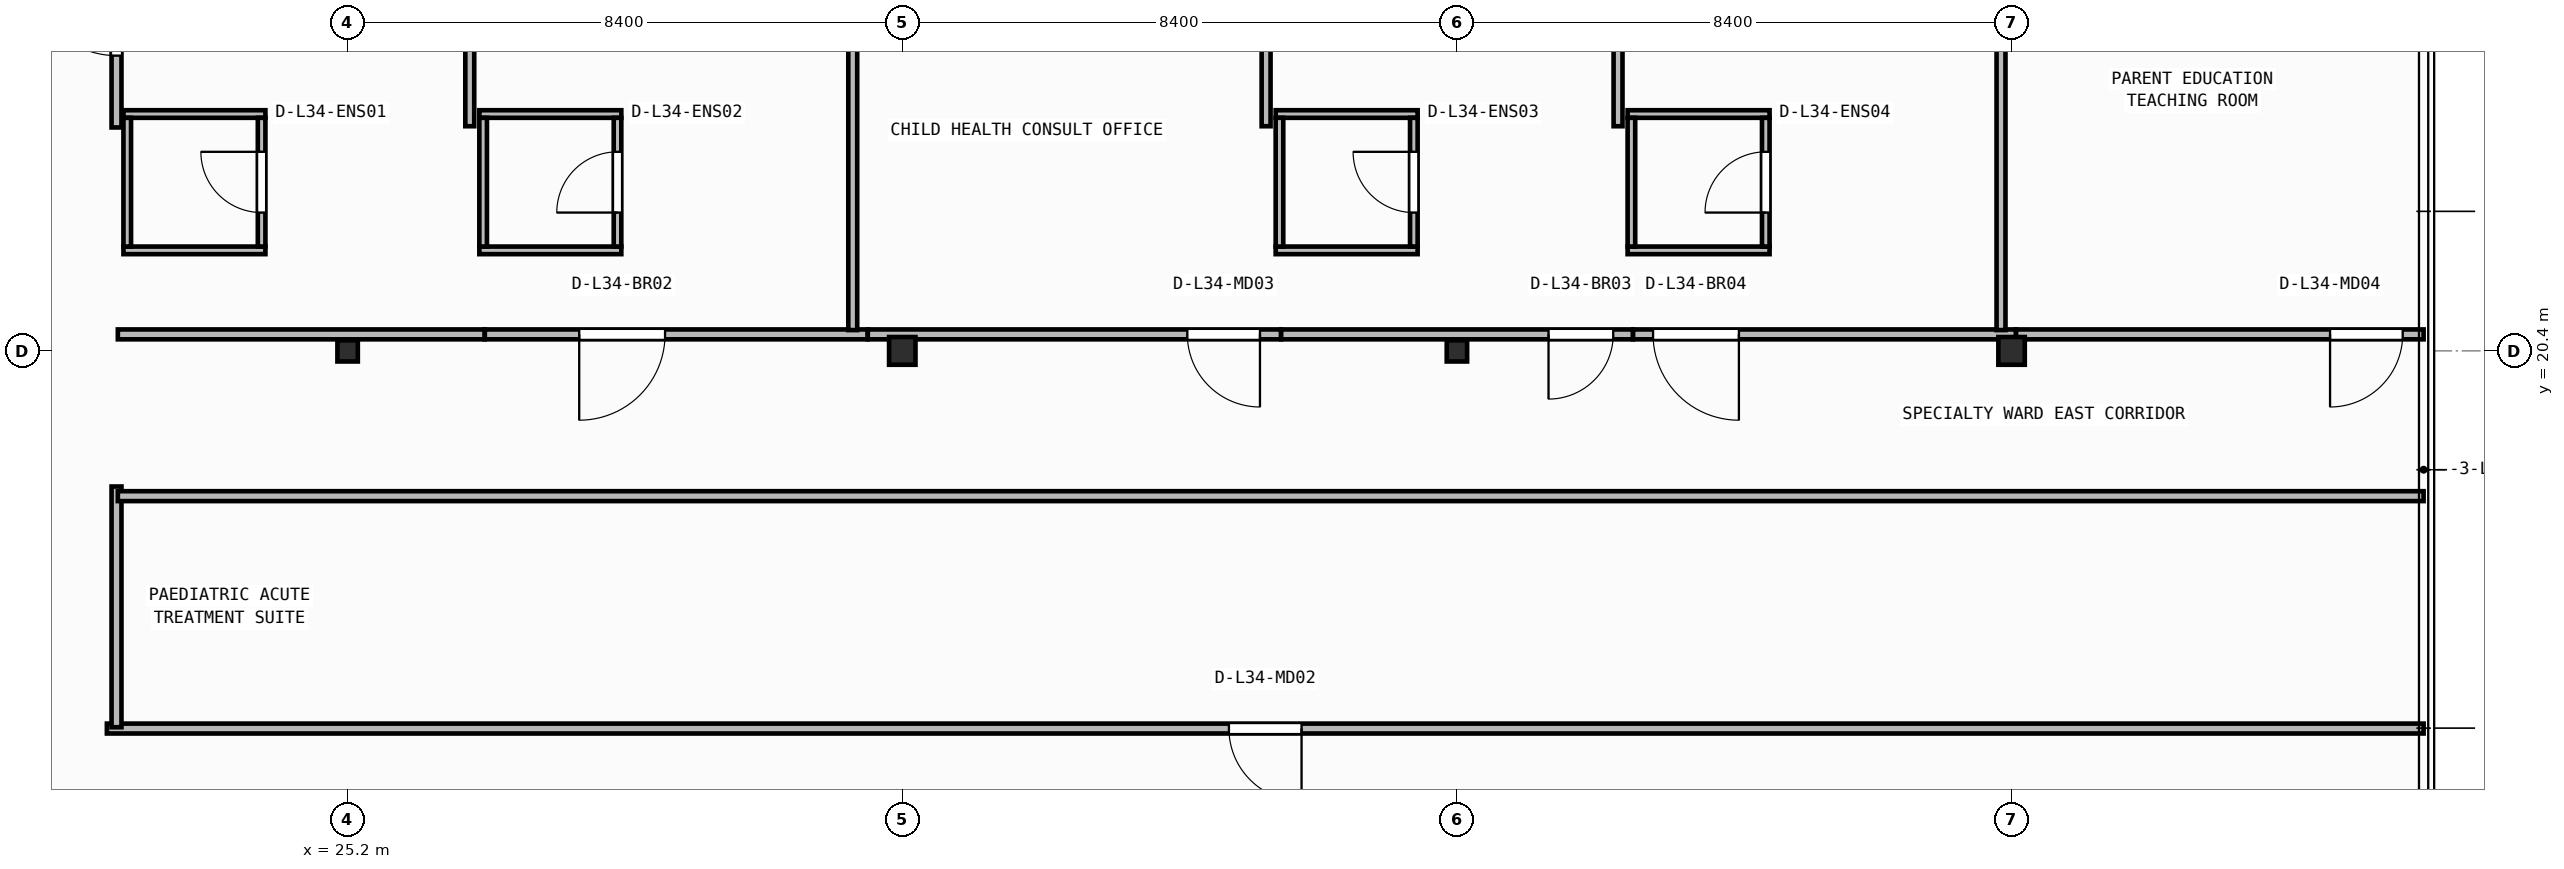
"""IFC4 building model, lengths in metres.
Left out: names, types, materials, properties, quantities, classifications, styles, units other than length and angle.
Written with IfcOpenShell. Run it as: python <this file> out.ifc"""

import sys

from ifc_helpers import new_model, si_unit, direction, frame, frame_2d, origin, origin_2d, place, context, subcontext, project, spatial, rectangle, i_section, extrude, element, fill, save


model = new_model("IFC4")
c1 = context("Model", 3, precision=1e-05, world=origin(), true_north=direction((0.0, 1.0)))
c2 = subcontext(c1, "Body", "Model", "MODEL_VIEW")
j1 = project(units=[si_unit("LENGTHUNIT", "METRE"), si_unit("PLANEANGLEUNIT", "RADIAN")], contexts=[c1])
p1 = place(None, origin())
s1 = spatial("IfcSite", under=j1, at=p1, CompositionType="ELEMENT")
p2 = place(p1, origin())
s2 = spatial("IfcBuilding", under=s1, at=p2, CompositionType="ELEMENT")
p3 = place(p2, frame((0.0, 0.0, 138.9)))
s3 = spatial("IfcBuildingStorey", under=s2, at=p3, CompositionType="ELEMENT", Elevation=138.9)
p4 = place(p3, frame((25.2, 20.4, 0.0), z_axis=(0.0, 0.0, 1.0), x_axis=(1.0, 0.0, 0.0)))
e1 = element("IfcColumn", 1, at=p4, inside=s3, PredefinedType="COLUMN", context=c2, shape_type="SweptSolid", body=[
    extrude(i_section(OverallWidth=0.309, OverallDepth=0.321, WebThickness=0.014, FlangeThickness=0.022, FilletRadius=0.017, at=origin_2d()), origin(), (0.0, 0.0, 1.0), 3.95),
])
p5 = place(p3, frame((33.6, 20.4, 0.0), z_axis=(0.0, 0.0, 1.0), x_axis=(1.0, 0.0, 0.0)))
e2 = element("IfcColumn", 2, at=p5, inside=s3, PredefinedType="COLUMN", context=c2, shape_type="SweptSolid", body=[
    extrude(i_section(OverallWidth=0.4, OverallDepth=0.42, WebThickness=0.025, FlangeThickness=0.04, at=origin_2d()), origin(), (0.0, 0.0, 1.0), 3.95),
])
p6 = place(p3, frame((42.0, 20.4, 0.0), z_axis=(0.0, 0.0, 1.0), x_axis=(1.0, 0.0, 0.0)))
e3 = element("IfcColumn", 3, at=p6, inside=s3, PredefinedType="COLUMN", context=c2, shape_type="SweptSolid", body=[
    extrude(i_section(OverallWidth=0.309, OverallDepth=0.321, WebThickness=0.014, FlangeThickness=0.022, FilletRadius=0.017, at=origin_2d()), origin(), (0.0, 0.0, 1.0), 3.95),
])
p7 = place(p3, frame((50.4, 20.4, 0.0), z_axis=(0.0, 0.0, 1.0), x_axis=(1.0, 0.0, 0.0)))
e4 = element("IfcColumn", 4, at=p7, inside=s3, PredefinedType="COLUMN", context=c2, shape_type="SweptSolid", body=[
    extrude(i_section(OverallWidth=0.4, OverallDepth=0.42, WebThickness=0.025, FlangeThickness=0.04, at=origin_2d()), origin(), (0.0, 0.0, 1.0), 3.95),
])
for number, where, z_axis, x_axis in (
    (5, (21.805, 21.923, 0.0), (0.0, 0.0, 1.0), (1.0, 0.0, 0.0)),
    (6, (21.805, 23.988, 0.0), (0.0, 0.0, 1.0), (1.0, 0.0, 0.0)),
):
    element("IfcWall", number, at=place(p3, frame(where, z_axis=z_axis, x_axis=x_axis)), inside=s3, PredefinedType="PARTITIONING", context=c2, shape_type="SweptSolid", body=[
        extrude(rectangle(XDim=2.15, YDim=0.115, at=frame_2d((1.075, 0.0))), origin(), (0.0, 0.0, 1.0), 3.71),
    ])
p8 = place(p3, frame((21.863, 21.98, 0.0), z_axis=(0.0, 0.0, 1.0), x_axis=(0.0, 1.0, 0.0)))
e7 = element("IfcWall", 7, at=p8, inside=s3, PredefinedType="PARTITIONING", context=c2, shape_type="SweptSolid", body=[
    extrude(rectangle(XDim=1.95, YDim=0.115, at=frame_2d((0.975, 0.0))), origin(), (0.0, 0.0, 1.0), 3.71),
])
p9 = place(p3, frame((23.897, 21.98, 0.0), z_axis=(0.0, 0.0, 1.0), x_axis=(0.0, 1.0, 0.0)))
e8 = element("IfcWall", 8, at=p9, inside=s3, PredefinedType="PARTITIONING", context=c2, shape_type="SweptSolid", body=[
    extrude(rectangle(XDim=1.95, YDim=0.115, at=frame_2d((0.975, 0.0))), origin(), (0.0, 0.0, 1.0), 3.71),
])
p10 = place(p9, frame((0.515, 0.0, 0.0)))
e9 = element("IfcOpeningElement", 9, at=p10, cuts=e8, PredefinedType="OPENING", context=c2, shape_type="SweptSolid", body=[
    extrude(rectangle(XDim=0.92, YDim=2.1, at=frame_2d((0.46, 1.05))), frame((0.0, 0.067, 0.0), z_axis=(0.0, -1.0, 0.0), x_axis=(1.0, 0.0, 0.0)), (0.0, 0.0, 1.0), 0.135),
])
for number, where, z_axis, x_axis in (
    (10, (27.195, 21.923, 0.0), (0.0, 0.0, 1.0), (1.0, 0.0, 0.0)),
    (11, (27.195, 23.988, 0.0), (0.0, 0.0, 1.0), (1.0, 0.0, 0.0)),
):
    element("IfcWall", number, at=place(p3, frame(where, z_axis=z_axis, x_axis=x_axis)), inside=s3, PredefinedType="PARTITIONING", context=c2, shape_type="SweptSolid", body=[
        extrude(rectangle(XDim=2.15, YDim=0.115, at=frame_2d((1.075, 0.0))), origin(), (0.0, 0.0, 1.0), 3.71),
    ])
p11 = place(p3, frame((27.252, 21.98, 0.0), z_axis=(0.0, 0.0, 1.0), x_axis=(0.0, 1.0, 0.0)))
e12 = element("IfcWall", 12, at=p11, inside=s3, PredefinedType="PARTITIONING", context=c2, shape_type="SweptSolid", body=[
    extrude(rectangle(XDim=1.95, YDim=0.115, at=frame_2d((0.975, 0.0))), origin(), (0.0, 0.0, 1.0), 3.71),
])
p12 = place(p3, frame((29.288, 21.98, 0.0), z_axis=(0.0, 0.0, 1.0), x_axis=(0.0, 1.0, 0.0)))
e13 = element("IfcWall", 13, at=p12, inside=s3, PredefinedType="PARTITIONING", context=c2, shape_type="SweptSolid", body=[
    extrude(rectangle(XDim=1.95, YDim=0.115, at=frame_2d((0.975, 0.0))), origin(), (0.0, 0.0, 1.0), 3.71),
])
p13 = place(p12, frame((0.515, 0.0, 0.0)))
e14 = element("IfcOpeningElement", 14, at=p13, cuts=e13, PredefinedType="OPENING", context=c2, shape_type="SweptSolid", body=[
    extrude(rectangle(XDim=0.92, YDim=2.1, at=frame_2d((0.46, 1.05))), frame((0.0, 0.067, 0.0), z_axis=(0.0, -1.0, 0.0), x_axis=(1.0, 0.0, 0.0)), (0.0, 0.0, 1.0), 0.135),
])
for number, where, z_axis, x_axis in (
    (15, (39.255, 21.923, 0.0), (0.0, 0.0, 1.0), (1.0, 0.0, 0.0)),
    (16, (39.255, 23.988, 0.0), (0.0, 0.0, 1.0), (1.0, 0.0, 0.0)),
):
    element("IfcWall", number, at=place(p3, frame(where, z_axis=z_axis, x_axis=x_axis)), inside=s3, PredefinedType="PARTITIONING", context=c2, shape_type="SweptSolid", body=[
        extrude(rectangle(XDim=2.15, YDim=0.115, at=frame_2d((1.075, 0.0))), origin(), (0.0, 0.0, 1.0), 3.71),
    ])
p14 = place(p3, frame((39.312, 21.98, 0.0), z_axis=(0.0, 0.0, 1.0), x_axis=(0.0, 1.0, 0.0)))
e17 = element("IfcWall", 17, at=p14, inside=s3, PredefinedType="PARTITIONING", context=c2, shape_type="SweptSolid", body=[
    extrude(rectangle(XDim=1.95, YDim=0.115, at=frame_2d((0.975, 0.0))), origin(), (0.0, 0.0, 1.0), 3.71),
])
p15 = place(p3, frame((41.347, 21.98, 0.0), z_axis=(0.0, 0.0, 1.0), x_axis=(0.0, 1.0, 0.0)))
e18 = element("IfcWall", 18, at=p15, inside=s3, PredefinedType="PARTITIONING", context=c2, shape_type="SweptSolid", body=[
    extrude(rectangle(XDim=1.95, YDim=0.115, at=frame_2d((0.975, 0.0))), origin(), (0.0, 0.0, 1.0), 3.71),
])
p16 = place(p15, frame((0.515, 0.0, 0.0)))
e19 = element("IfcOpeningElement", 19, at=p16, cuts=e18, PredefinedType="OPENING", context=c2, shape_type="SweptSolid", body=[
    extrude(rectangle(XDim=0.92, YDim=2.1, at=frame_2d((0.46, 1.05))), frame((0.0, 0.067, 0.0), z_axis=(0.0, -1.0, 0.0), x_axis=(1.0, 0.0, 0.0)), (0.0, 0.0, 1.0), 0.135),
])
for number, where, z_axis, x_axis in (
    (20, (44.585, 21.923, 0.0), (0.0, 0.0, 1.0), (1.0, 0.0, 0.0)),
    (21, (44.585, 23.988, 0.0), (0.0, 0.0, 1.0), (1.0, 0.0, 0.0)),
):
    element("IfcWall", number, at=place(p3, frame(where, z_axis=z_axis, x_axis=x_axis)), inside=s3, PredefinedType="PARTITIONING", context=c2, shape_type="SweptSolid", body=[
        extrude(rectangle(XDim=2.15, YDim=0.115, at=frame_2d((1.075, 0.0))), origin(), (0.0, 0.0, 1.0), 3.71),
    ])
p17 = place(p3, frame((44.643, 21.98, 0.0), z_axis=(0.0, 0.0, 1.0), x_axis=(0.0, 1.0, 0.0)))
e22 = element("IfcWall", 22, at=p17, inside=s3, PredefinedType="PARTITIONING", context=c2, shape_type="SweptSolid", body=[
    extrude(rectangle(XDim=1.95, YDim=0.115, at=frame_2d((0.975, 0.0))), origin(), (0.0, 0.0, 1.0), 3.71),
])
p18 = place(p3, frame((46.677, 21.98, 0.0), z_axis=(0.0, 0.0, 1.0), x_axis=(0.0, 1.0, 0.0)))
e23 = element("IfcWall", 23, at=p18, inside=s3, PredefinedType="PARTITIONING", context=c2, shape_type="SweptSolid", body=[
    extrude(rectangle(XDim=1.95, YDim=0.115, at=frame_2d((0.975, 0.0))), origin(), (0.0, 0.0, 1.0), 3.71),
])
p19 = place(p18, frame((0.515, 0.0, 0.0)))
e24 = element("IfcOpeningElement", 24, at=p19, cuts=e23, PredefinedType="OPENING", context=c2, shape_type="SweptSolid", body=[
    extrude(rectangle(XDim=0.92, YDim=2.1, at=frame_2d((0.46, 1.05))), frame((0.0, 0.067, 0.0), z_axis=(0.0, -1.0, 0.0), x_axis=(1.0, 0.0, 0.0)), (0.0, 0.0, 1.0), 0.135),
])
p20 = place(p3, frame((56.64, 14.68, 0.0), z_axis=(0.0, 0.0, 1.0), x_axis=(-1.0, 0.0, 0.0)))
e25 = element("IfcWall", 25, at=p20, inside=s3, PredefinedType="PARTITIONING", context=c2, shape_type="SweptSolid", body=[
    extrude(rectangle(XDim=35.086, YDim=0.15, at=frame_2d((17.543, 0.0))), origin(), (0.0, 0.0, 1.0), 3.71),
])
p21 = place(p20, frame((16.993, 0.0, 0.0)))
e26 = element("IfcOpeningElement", 26, at=p21, cuts=e25, PredefinedType="OPENING", context=c2, shape_type="SweptSolid", body=[
    extrude(rectangle(XDim=1.1, YDim=2.1, at=frame_2d((0.55, 1.05))), frame((0.0, 0.085, 0.0), z_axis=(0.0, -1.0, 0.0), x_axis=(1.0, 0.0, 0.0)), (0.0, 0.0, 1.0), 0.17),
])
p22 = place(p3, frame((21.7, 14.7, 0.0), z_axis=(0.0, 0.0, 1.0), x_axis=(0.0, 1.0, 0.0)))
e27 = element("IfcWall", 27, at=p22, inside=s3, PredefinedType="PARTITIONING", context=c2, shape_type="SweptSolid", body=[
    extrude(rectangle(XDim=3.646, YDim=0.15, at=frame_2d((1.823, 0.0))), origin(), (0.0, 0.0, 1.0), 3.71),
])
p23 = place(p3, frame((21.7, 23.784, 0.0), z_axis=(0.0, 0.0, 1.0), x_axis=(0.0, 1.0, 0.0)))
e28 = element("IfcWall", 28, at=p23, inside=s3, PredefinedType="PARTITIONING", context=c2, shape_type="SweptSolid", body=[
    extrude(rectangle(XDim=3.476, YDim=0.15, at=frame_2d((1.738, 0.0))), origin(), (0.0, 0.0, 1.0), 3.71),
])
p24 = place(p23, frame((1.088, 0.0, 0.0)))
e29 = element("IfcOpeningElement", 29, at=p24, cuts=e28, PredefinedType="OPENING", context=c2, shape_type="SweptSolid", body=[
    extrude(rectangle(XDim=1.3, YDim=2.15, at=frame_2d((0.65, 1.075))), frame((0.0, 0.085, 0.0), z_axis=(0.0, -1.0, 0.0), x_axis=(1.0, 0.0, 0.0)), (0.0, 0.0, 1.0), 0.17),
])
p25 = place(p3, frame((21.72, 18.2, 0.0), z_axis=(0.0, 0.0, 1.0), x_axis=(1.0, 0.0, 0.0)))
e30 = element("IfcWall", 30, at=p25, inside=s3, PredefinedType="PARTITIONING", context=c2, shape_type="SweptSolid", body=[
    extrude(rectangle(XDim=34.92, YDim=0.15, at=frame_2d((17.46, 0.0))), origin(), (0.0, 0.0, 1.0), 3.71),
])
p26 = place(p3, frame((27.276, 20.65, 0.0), z_axis=(0.0, 0.0, 1.0), x_axis=(-1.0, 0.0, 0.0)))
e31 = element("IfcWall", 31, at=p26, inside=s3, PredefinedType="PARTITIONING", context=c2, shape_type="SweptSolid", body=[
    extrude(rectangle(XDim=5.556, YDim=0.15, at=frame_2d((2.778, 0.0))), origin(), (0.0, 0.0, 1.0), 3.083),
])
p27 = place(p3, frame((33.076, 20.65, 0.0), z_axis=(0.0, 0.0, 1.0), x_axis=(-1.0, 0.0, 0.0)))
e32 = element("IfcWall", 32, at=p27, inside=s3, PredefinedType="PARTITIONING", context=c2, shape_type="SweptSolid", body=[
    extrude(rectangle(XDim=5.798, YDim=0.15, at=frame_2d((2.899, 0.0))), origin(), (0.0, 0.0, 1.0), 3.083),
])
p28 = place(p27, frame((3.069, 0.0, 0.0)))
e33 = element("IfcOpeningElement", 33, at=p28, cuts=e32, PredefinedType="OPENING", context=c2, shape_type="SweptSolid", body=[
    extrude(rectangle(XDim=1.3, YDim=2.15, at=frame_2d((0.65, 1.075))), frame((0.0, 0.085, 0.0), z_axis=(0.0, -1.0, 0.0), x_axis=(1.0, 0.0, 0.0)), (0.0, 0.0, 1.0), 0.17),
])
p29 = place(p3, frame((39.336, 20.65, 0.0), z_axis=(0.0, 0.0, 1.0), x_axis=(-1.0, 0.0, 0.0)))
e34 = element("IfcWall", 34, at=p29, inside=s3, PredefinedType="PARTITIONING", context=c2, shape_type="SweptSolid", body=[
    extrude(rectangle(XDim=6.258, YDim=0.15, at=frame_2d((3.129, 0.0))), origin(), (0.0, 0.0, 1.0), 3.083),
])
p30 = place(p29, frame((0.319, 0.0, 0.0)))
e35 = element("IfcOpeningElement", 35, at=p30, cuts=e34, PredefinedType="OPENING", context=c2, shape_type="SweptSolid", body=[
    extrude(rectangle(XDim=1.1, YDim=2.1, at=frame_2d((0.55, 1.05))), frame((0.0, 0.085, 0.0), z_axis=(0.0, -1.0, 0.0), x_axis=(1.0, 0.0, 0.0)), (0.0, 0.0, 1.0), 0.17),
])
p31 = place(p3, frame((44.666, 20.65, 0.0), z_axis=(0.0, 0.0, 1.0), x_axis=(-1.0, 0.0, 0.0)))
e36 = element("IfcWall", 36, at=p31, inside=s3, PredefinedType="PARTITIONING", context=c2, shape_type="SweptSolid", body=[
    extrude(rectangle(XDim=5.328, YDim=0.15, at=frame_2d((2.664, 0.0))), origin(), (0.0, 0.0, 1.0), 3.083),
])
p32 = place(p31, frame((0.299, 0.0, 0.0)))
e37 = element("IfcOpeningElement", 37, at=p32, cuts=e36, PredefinedType="OPENING", context=c2, shape_type="SweptSolid", body=[
    extrude(rectangle(XDim=0.98, YDim=2.1, at=frame_2d((0.49, 1.05))), frame((0.0, 0.085, 0.0), z_axis=(0.0, -1.0, 0.0), x_axis=(1.0, 0.0, 0.0)), (0.0, 0.0, 1.0), 0.17),
])
p33 = place(p3, frame((50.466, 20.65, 0.0), z_axis=(0.0, 0.0, 1.0), x_axis=(-1.0, 0.0, 0.0)))
e38 = element("IfcWall", 38, at=p33, inside=s3, PredefinedType="PARTITIONING", context=c2, shape_type="SweptSolid", body=[
    extrude(rectangle(XDim=5.798, YDim=0.15, at=frame_2d((2.899, 0.0))), origin(), (0.0, 0.0, 1.0), 3.083),
])
p34 = place(p33, frame((4.196, 0.0, 0.0)))
e39 = element("IfcOpeningElement", 39, at=p34, cuts=e38, PredefinedType="OPENING", context=c2, shape_type="SweptSolid", body=[
    extrude(rectangle(XDim=1.3, YDim=2.15, at=frame_2d((0.65, 1.075))), frame((0.0, 0.085, 0.0), z_axis=(0.0, -1.0, 0.0), x_axis=(1.0, 0.0, 0.0)), (0.0, 0.0, 1.0), 0.17),
])
p35 = place(p3, frame((56.64, 20.65, 0.0), z_axis=(0.0, 0.0, 1.0), x_axis=(-1.0, 0.0, 0.0)))
e40 = element("IfcWall", 40, at=p35, inside=s3, PredefinedType="PARTITIONING", context=c2, shape_type="SweptSolid", body=[
    extrude(rectangle(XDim=6.172, YDim=0.15, at=frame_2d((3.086, 0.0))), origin(), (0.0, 0.0, 1.0), 3.71),
])
p36 = place(p35, frame((0.317, 0.0, 0.0)))
e41 = element("IfcOpeningElement", 41, at=p36, cuts=e40, PredefinedType="OPENING", context=c2, shape_type="SweptSolid", body=[
    extrude(rectangle(XDim=1.1, YDim=2.1, at=frame_2d((0.55, 1.05))), frame((0.0, 0.085, 0.0), z_axis=(0.0, -1.0, 0.0), x_axis=(1.0, 0.0, 0.0)), (0.0, 0.0, 1.0), 0.17),
])
p37 = place(p3, frame((27.05, 23.802, 0.0), z_axis=(0.0, 0.0, 1.0), x_axis=(0.0, 1.0, 0.0)))
e42 = element("IfcWall", 42, at=p37, inside=s3, PredefinedType="PARTITIONING", context=c2, shape_type="SweptSolid", body=[
    extrude(rectangle(XDim=3.298, YDim=0.135, at=frame_2d((1.649, 0.0))), origin(), (0.0, 0.0, 1.0), 3.71),
])
p38 = place(p3, frame((32.85, 20.715, 0.0), z_axis=(0.0, 0.0, 1.0), x_axis=(0.0, 1.0, 0.0)))
e43 = element("IfcWall", 43, at=p38, inside=s3, PredefinedType="PARTITIONING", context=c2, shape_type="SweptSolid", body=[
    extrude(rectangle(XDim=6.385, YDim=0.135, at=frame_2d((3.192, 0.0))), origin(), (0.0, 0.0, 1.0), 3.71),
])
for number, where, z_axis, x_axis in (
    (44, (39.11, 23.802, 0.0), (0.0, 0.0, 1.0), (0.0, 1.0, 0.0)),
    (45, (44.44, 23.802, 0.0), (0.0, 0.0, 1.0), (0.0, 1.0, 0.0)),
):
    element("IfcWall", number, at=place(p3, frame(where, z_axis=z_axis, x_axis=x_axis)), inside=s3, PredefinedType="PARTITIONING", context=c2, shape_type="SweptSolid", body=[
        extrude(rectangle(XDim=3.298, YDim=0.135, at=frame_2d((1.649, 0.0))), origin(), (0.0, 0.0, 1.0), 3.71),
    ])
p39 = place(p3, frame((50.24, 20.715, 0.0), z_axis=(0.0, 0.0, 1.0), x_axis=(0.0, 1.0, 0.0)))
e46 = element("IfcWall", 46, at=p39, inside=s3, PredefinedType="PARTITIONING", context=c2, shape_type="SweptSolid", body=[
    extrude(rectangle(XDim=6.385, YDim=0.135, at=frame_2d((3.192, 0.0))), origin(), (0.0, 0.0, 1.0), 3.152),
])
p40 = place(p10, origin())
e47 = element("IfcDoor", 47, at=p40, inside=s3, OperationType="SINGLE_SWING_RIGHT", PredefinedType="DOOR", context=c2, shape_type="SweptSolid", body=[
    extrude(rectangle(XDim=0.92, YDim=2.1, at=frame_2d((0.46, 1.05))), frame((0.0, 0.025, 0.0), z_axis=(0.0, -1.0, 0.0), x_axis=(1.0, 0.0, 0.0)), (0.0, 0.0, 1.0), 0.05),
])
fill(e9, e47)
p41 = place(p13, origin())
e48 = element("IfcDoor", 48, at=p41, inside=s3, OperationType="SINGLE_SWING_LEFT", PredefinedType="DOOR", context=c2, shape_type="SweptSolid", body=[
    extrude(rectangle(XDim=0.92, YDim=2.1, at=frame_2d((0.46, 1.05))), frame((0.0, 0.025, 0.0), z_axis=(0.0, -1.0, 0.0), x_axis=(1.0, 0.0, 0.0)), (0.0, 0.0, 1.0), 0.05),
])
fill(e14, e48)
p42 = place(p16, origin())
e49 = element("IfcDoor", 49, at=p42, inside=s3, OperationType="SINGLE_SWING_RIGHT", PredefinedType="DOOR", context=c2, shape_type="SweptSolid", body=[
    extrude(rectangle(XDim=0.92, YDim=2.1, at=frame_2d((0.46, 1.05))), frame((0.0, 0.025, 0.0), z_axis=(0.0, -1.0, 0.0), x_axis=(1.0, 0.0, 0.0)), (0.0, 0.0, 1.0), 0.05),
])
fill(e19, e49)
p43 = place(p19, origin())
e50 = element("IfcDoor", 50, at=p43, inside=s3, OperationType="SINGLE_SWING_LEFT", PredefinedType="DOOR", context=c2, shape_type="SweptSolid", body=[
    extrude(rectangle(XDim=0.92, YDim=2.1, at=frame_2d((0.46, 1.05))), frame((0.0, 0.025, 0.0), z_axis=(0.0, -1.0, 0.0), x_axis=(1.0, 0.0, 0.0)), (0.0, 0.0, 1.0), 0.05),
])
fill(e24, e50)
p44 = place(p21, origin())
e51 = element("IfcDoor", 51, at=p44, inside=s3, OperationType="SINGLE_SWING_LEFT", PredefinedType="DOOR", context=c2, shape_type="SweptSolid", body=[
    extrude(rectangle(XDim=1.1, YDim=2.1, at=frame_2d((0.55, 1.05))), frame((0.0, 0.025, 0.0), z_axis=(0.0, -1.0, 0.0), x_axis=(1.0, 0.0, 0.0)), (0.0, 0.0, 1.0), 0.05),
])
fill(e26, e51)
p45 = place(p24, origin())
e52 = element("IfcDoor", 52, at=p45, inside=s3, OperationType="SINGLE_SWING_RIGHT", PredefinedType="DOOR", context=c2, shape_type="SweptSolid", body=[
    extrude(rectangle(XDim=1.3, YDim=2.15, at=frame_2d((0.65, 1.075))), frame((0.0, 0.025, 0.0), z_axis=(0.0, -1.0, 0.0), x_axis=(1.0, 0.0, 0.0)), (0.0, 0.0, 1.0), 0.05),
])
fill(e29, e52)
p46 = place(p28, origin())
e53 = element("IfcDoor", 53, at=p46, inside=s3, OperationType="SINGLE_SWING_RIGHT", PredefinedType="DOOR", context=c2, shape_type="SweptSolid", body=[
    extrude(rectangle(XDim=1.3, YDim=2.15, at=frame_2d((0.65, 1.075))), frame((0.0, 0.025, 0.0), z_axis=(0.0, -1.0, 0.0), x_axis=(1.0, 0.0, 0.0)), (0.0, 0.0, 1.0), 0.05),
])
fill(e33, e53)
p47 = place(p30, origin())
e54 = element("IfcDoor", 54, at=p47, inside=s3, OperationType="SINGLE_SWING_LEFT", PredefinedType="DOOR", context=c2, shape_type="SweptSolid", body=[
    extrude(rectangle(XDim=1.1, YDim=2.1, at=frame_2d((0.55, 1.05))), frame((0.0, 0.025, 0.0), z_axis=(0.0, -1.0, 0.0), x_axis=(1.0, 0.0, 0.0)), (0.0, 0.0, 1.0), 0.05),
])
fill(e35, e54)
p48 = place(p32, origin())
e55 = element("IfcDoor", 55, at=p48, inside=s3, OperationType="SINGLE_SWING_RIGHT", PredefinedType="DOOR", context=c2, shape_type="SweptSolid", body=[
    extrude(rectangle(XDim=0.98, YDim=2.1, at=frame_2d((0.49, 1.05))), frame((0.0, 0.025, 0.0), z_axis=(0.0, -1.0, 0.0), x_axis=(1.0, 0.0, 0.0)), (0.0, 0.0, 1.0), 0.05),
])
fill(e37, e55)
p49 = place(p34, origin())
e56 = element("IfcDoor", 56, at=p49, inside=s3, OperationType="SINGLE_SWING_LEFT", PredefinedType="DOOR", context=c2, shape_type="SweptSolid", body=[
    extrude(rectangle(XDim=1.3, YDim=2.15, at=frame_2d((0.65, 1.075))), frame((0.0, 0.025, 0.0), z_axis=(0.0, -1.0, 0.0), x_axis=(1.0, 0.0, 0.0)), (0.0, 0.0, 1.0), 0.05),
])
fill(e39, e56)
p50 = place(p36, origin())
e57 = element("IfcDoor", 57, at=p50, inside=s3, OperationType="SINGLE_SWING_RIGHT", PredefinedType="DOOR", context=c2, shape_type="SweptSolid", body=[
    extrude(rectangle(XDim=1.1, YDim=2.1, at=frame_2d((0.55, 1.05))), frame((0.0, 0.025, 0.0), z_axis=(0.0, -1.0, 0.0), x_axis=(1.0, 0.0, 0.0)), (0.0, 0.0, 1.0), 0.05),
])
fill(e41, e57)
save(model, sys.argv[1])
